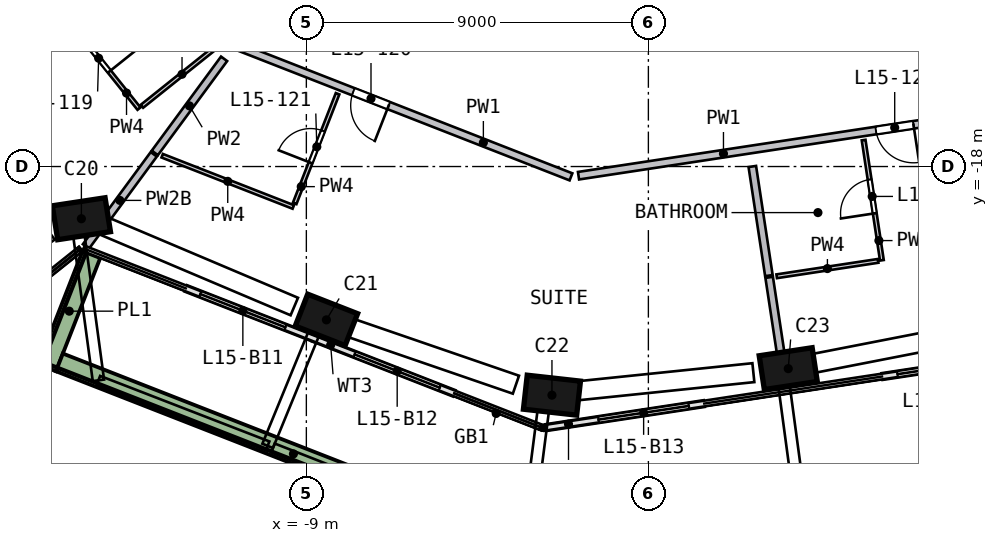
"""IFC4 building model, lengths in metres.
Left out: names, types, materials, properties, quantities, classifications, styles, units other than length and angle.
Written with IfcOpenShell. Run it as: python <this file> out.ifc"""

import sys

from ifc_helpers import new_model, si_unit, direction, frame, frame_2d, origin, origin_2d, place, context, subcontext, project, spatial, rectangle, extrude, element, fill, save


model = new_model("IFC4")
c1 = context("Model", 3, precision=1e-05, world=origin(), true_north=direction((0.0, 1.0)))
c2 = subcontext(c1, "Body", "Model", "MODEL_VIEW")
j1 = project(units=[si_unit("LENGTHUNIT", "METRE"), si_unit("PLANEANGLEUNIT", "RADIAN")], contexts=[c1])
p1 = place(None, origin())
s1 = spatial("IfcSite", under=j1, at=p1, CompositionType="ELEMENT")
p2 = place(p1, origin())
s2 = spatial("IfcBuilding", under=s1, at=p2, CompositionType="ELEMENT")
p3 = place(p2, frame((0.0, 0.0, 68.0)))
s3 = spatial("IfcBuildingStorey", under=s2, at=p3, CompositionType="ELEMENT", Elevation=68.0)
p4 = place(p3, frame((-15.031, -19.289, 0.0), z_axis=(0.092283458, -0.07061889, 0.99322542), x_axis=(-0.984352018, -0.156849959, 0.080306883)))
e1 = element("IfcColumn", 1, at=p4, inside=s3, PredefinedType="COLUMN", context=c2, shape_type="SweptSolid", body=[
    extrude(rectangle(XDim=1.4, YDim=0.9, at=origin_2d()), origin(), (0.0, 0.0, 1.0), 3.212),
])
p5 = place(p3, frame((-8.599, -21.987, 0.0), z_axis=(0.104949359, -0.040002437, 0.993672701), x_axis=(0.925474949, -0.361776799, -0.112310579)))
e2 = element("IfcColumn", 2, at=p5, inside=s3, PredefinedType="COLUMN", context=c2, shape_type="SweptSolid", body=[
    extrude(rectangle(XDim=1.4, YDim=0.9, at=origin_2d()), origin(), (0.0, 0.0, 1.0), 3.21),
])
p6 = place(p3, frame((-2.675, -24.003, 0.0), z_axis=(0.11419492, -0.011708401, 0.993389367), x_axis=(-0.987313425, 0.109706748, 0.1147895)))
e3 = element("IfcColumn", 3, at=p6, inside=s3, PredefinedType="COLUMN", context=c2, shape_type="SweptSolid", body=[
    extrude(rectangle(XDim=1.4, YDim=0.9, at=origin_2d()), origin(), (0.0, 0.0, 1.0), 3.211),
])
p7 = place(p3, frame((3.547, -23.34, 0.0), z_axis=(0.110881458, 0.01779579, 0.993674299), x_axis=(0.982419922, 0.149132846, -0.112296444)))
e4 = element("IfcColumn", 4, at=p7, inside=s3, PredefinedType="COLUMN", context=c2, shape_type="SweptSolid", body=[
    extrude(rectangle(XDim=1.4, YDim=0.9, at=origin_2d()), origin(), (0.0, 0.0, 1.0), 3.21),
])
p8 = place(p3, frame((-12.161, -21.211, 0.0), z_axis=(0.0, 0.0, 1.0), x_axis=(0.931306801, -0.364235697, 0.0)))
e5 = element("IfcWall", 5, at=p8, inside=s3, PredefinedType="SOLIDWALL", context=c2, shape_type="SweptSolid", body=[
    extrude(rectangle(XDim=3.6, YDim=0.15, at=frame_2d((1.8, 0.0))), origin(), (0.0, 0.0, 1.0), 2.425),
])
p9 = place(p8, frame((0.4, 0.0, 0.0)))
e6 = element("IfcOpeningElement", 6, at=p9, cuts=e5, PredefinedType="OPENING", context=c2, shape_type="SweptSolid", body=[
    extrude(rectangle(XDim=2.4, YDim=2.4, at=frame_2d((1.2, 1.2))), frame((0.0, 0.085, 0.0), z_axis=(0.0, -1.0, 0.0), x_axis=(1.0, 0.0, 0.0)), (0.0, 0.0, 1.0), 0.17),
])
p10 = place(p3, frame((-8.808, -22.522, 0.0), z_axis=(0.0, 0.0, 1.0), x_axis=(0.931314617, -0.364215712, 0.0)))
e7 = element("IfcWall", 7, at=p10, inside=s3, PredefinedType="SOLIDWALL", context=c2, shape_type="SweptSolid", body=[
    extrude(rectangle(XDim=3.96, YDim=0.15, at=frame_2d((1.98, 0.0))), origin(), (0.0, 0.0, 1.0), 2.425),
])
p11 = place(p10, frame((1.16, 0.0, 0.0)))
e8 = element("IfcOpeningElement", 8, at=p11, cuts=e7, PredefinedType="OPENING", context=c2, shape_type="SweptSolid", body=[
    extrude(rectangle(XDim=2.4, YDim=2.4, at=frame_2d((1.2, 1.2))), frame((0.0, 0.085, 0.0), z_axis=(0.0, -1.0, 0.0), x_axis=(1.0, 0.0, 0.0)), (0.0, 0.0, 1.0), 0.17),
])
p12 = place(p3, frame((-2.694, -24.87, 0.0), z_axis=(0.0, 0.0, 1.0), x_axis=(0.988648334, 0.150248032, 0.0)))
e9 = element("IfcWall", 9, at=p12, inside=s3, PredefinedType="SOLIDWALL", context=c2, shape_type="SweptSolid", body=[
    extrude(rectangle(XDim=4.199, YDim=0.15, at=frame_2d((2.099, 0.0))), origin(), (0.0, 0.0, 1.0), 2.425),
])
p13 = place(p12, frame((1.399, 0.0, 0.0)))
e10 = element("IfcOpeningElement", 10, at=p13, cuts=e9, PredefinedType="OPENING", context=c2, shape_type="SweptSolid", body=[
    extrude(rectangle(XDim=2.4, YDim=2.4, at=frame_2d((1.2, 1.2))), frame((0.0, 0.085, 0.0), z_axis=(0.0, -1.0, 0.0), x_axis=(1.0, 0.0, 0.0)), (0.0, 0.0, 1.0), 0.17),
])
p14 = place(p3, frame((6.162, -23.525, 0.0), z_axis=(0.0, 0.0, 1.0), x_axis=(0.988650664, 0.150232704, 0.0)))
e11 = element("IfcWall", 11, at=p14, inside=s3, PredefinedType="SOLIDWALL", context=c2, shape_type="SweptSolid", body=[
    extrude(rectangle(XDim=3.842, YDim=0.15, at=frame_2d((1.921, 0.0))), origin(), (0.0, 0.0, 1.0), 2.425),
])
p15 = place(p14, frame((0.4, 0.0, 0.0)))
e12 = element("IfcOpeningElement", 12, at=p15, cuts=e11, PredefinedType="OPENING", context=c2, shape_type="SweptSolid", body=[
    extrude(rectangle(XDim=2.4, YDim=2.4, at=frame_2d((1.2, 1.2))), frame((0.0, 0.085, 0.0), z_axis=(0.0, -1.0, 0.0), x_axis=(1.0, 0.0, 0.0)), (0.0, 0.0, 1.0), 0.17),
])
p16 = place(p3, frame((-14.656, -20.317, 0.0), z_axis=(0.0, 0.0, 1.0), x_axis=(-0.364261223, -0.931296817, 0.0)))
e13 = element("IfcWall", 13, at=p16, inside=s3, PredefinedType="SOLIDWALL", context=c2, shape_type="SweptSolid", body=[
    extrude(rectangle(XDim=3.199, YDim=0.5, at=frame_2d((1.6, 0.0))), origin(), (0.0, 0.0, 1.0), 0.7),
])
p17 = place(p3, frame((-15.498, -23.154, 0.0), z_axis=(0.0, 0.0, 1.0), x_axis=(0.931308957, -0.364230183, 0.0)))
e14 = element("IfcWall", 14, at=p17, inside=s3, PredefinedType="SOLIDWALL", context=c2, shape_type="SweptSolid", body=[
    extrude(rectangle(XDim=13.224, YDim=0.5, at=frame_2d((6.612, 0.0))), origin(), (0.0, 0.0, 1.0), 0.7),
])
p18 = place(p3, frame((-3.054, -27.985, 0.0), z_axis=(0.0, 0.0, 1.0), x_axis=(0.988652978, 0.150217471, 0.0)))
e15 = element("IfcWall", 15, at=p18, inside=s3, PredefinedType="SOLIDWALL", context=c2, shape_type="SweptSolid", body=[
    extrude(rectangle(XDim=13.724, YDim=0.5, at=frame_2d((6.862, 0.0))), origin(), (0.0, 0.0, 1.0), 0.7),
])
p19 = place(p3, frame((-26.85, -20.057, 0.0), z_axis=(0.0, 0.0, 1.0), x_axis=(0.78108065, 0.624430155, 0.0)))
e16 = element("IfcWall", 16, at=p19, inside=s3, PredefinedType="SOLIDWALL", context=c2, shape_type="SweptSolid", body=[
    extrude(rectangle(XDim=15.738, YDim=0.2, at=frame_2d((7.869, 0.0))), origin(), (0.0, 0.0, 1.0), 3.19),
])
p20 = place(p19, frame((9.769, 0.0, 0.0)))
e17 = element("IfcOpeningElement", 17, at=p20, cuts=e16, PredefinedType="OPENING", context=c2, shape_type="SweptSolid", body=[
    extrude(rectangle(XDim=1.0, YDim=2.1, at=frame_2d((0.5, 1.05))), frame((0.0, 0.11, 0.0), z_axis=(0.0, -1.0, 0.0), x_axis=(1.0, 0.0, 0.0)), (0.0, 0.0, 1.0), 0.22),
])
p21 = place(p3, frame((-13.34, -12.073, 0.0), z_axis=(0.0, 0.0, 1.0), x_axis=(-0.781097167, -0.624409493, 0.0)))
e18 = element("IfcWall", 18, at=p21, inside=s3, PredefinedType="SOLIDWALL", context=c2, shape_type="SweptSolid", body=[
    extrude(rectangle(XDim=15.538, YDim=0.2, at=frame_2d((7.769, 0.0))), origin(), (0.0, 0.0, 1.0), 3.19),
])
p22 = place(p21, frame((6.85, 0.0, 0.0)))
e19 = element("IfcOpeningElement", 19, at=p22, cuts=e18, PredefinedType="OPENING", context=c2, shape_type="SweptSolid", body=[
    extrude(rectangle(XDim=1.0, YDim=2.1, at=frame_2d((0.5, 1.05))), frame((0.0, 0.11, 0.0), z_axis=(0.0, -1.0, 0.0), x_axis=(1.0, 0.0, 0.0)), (0.0, 0.0, 1.0), 0.22),
])
p23 = place(p3, frame((-2.037, -18.271, 0.0), z_axis=(0.0, 0.0, 1.0), x_axis=(-0.931306737, 0.364235861, 0.0)))
e20 = element("IfcWall", 20, at=p23, inside=s3, PredefinedType="SOLIDWALL", context=c2, shape_type="SweptSolid", body=[
    extrude(rectangle(XDim=9.516, YDim=0.2, at=frame_2d((4.758, 0.0))), origin(), (0.0, 0.0, 1.0), 3.19),
])
p24 = place(p23, frame((5.15, 0.0, 0.0)))
e21 = element("IfcOpeningElement", 21, at=p24, cuts=e20, PredefinedType="OPENING", context=c2, shape_type="SweptSolid", body=[
    extrude(rectangle(XDim=1.0, YDim=2.1, at=frame_2d((0.5, 1.05))), frame((0.0, 0.11, 0.0), z_axis=(0.0, -1.0, 0.0), x_axis=(1.0, 0.0, 0.0)), (0.0, 0.0, 1.0), 0.22),
])
p25 = place(p3, frame((7.174, -16.872, 0.0), z_axis=(0.0, 0.0, 1.0), x_axis=(-0.988652066, -0.150223477, 0.0)))
e22 = element("IfcWall", 22, at=p25, inside=s3, PredefinedType="SOLIDWALL", context=c2, shape_type="SweptSolid", body=[
    extrude(rectangle(XDim=9.116, YDim=0.2, at=frame_2d((4.558, 0.0))), origin(), (0.0, 0.0, 1.0), 3.19),
])
p26 = place(p25, frame((0.2, 0.0, 0.0)))
e23 = element("IfcOpeningElement", 23, at=p26, cuts=e22, PredefinedType="OPENING", context=c2, shape_type="SweptSolid", body=[
    extrude(rectangle(XDim=1.0, YDim=2.1, at=frame_2d((0.5, 1.05))), frame((0.0, 0.11, 0.0), z_axis=(0.0, -1.0, 0.0), x_axis=(1.0, 0.0, 0.0)), (0.0, 0.0, 1.0), 0.22),
])
p27 = place(p3, frame((-13.015, -17.679, 0.0), z_axis=(0.0, 0.0, 1.0), x_axis=(-0.592828383, -0.80532882, 0.0)))
e24 = element("IfcWall", 24, at=p27, inside=s3, PredefinedType="SOLIDWALL", context=c2, shape_type="SweptSolid", body=[
    extrude(rectangle(XDim=3.011, YDim=0.2, at=frame_2d((1.506, 0.0))), origin(), (0.0, 0.0, 1.0), 2.69),
])
p28 = place(p3, frame((-11.165, -15.166, 0.0), z_axis=(0.0, 0.0, 1.0), x_axis=(-0.592836025, -0.805323194, 0.0)))
e25 = element("IfcWall", 25, at=p28, inside=s3, PredefinedType="SOLIDWALL", context=c2, shape_type="SweptSolid", body=[
    extrude(rectangle(XDim=3.075, YDim=0.2, at=frame_2d((1.537, 0.0))), origin(), (0.0, 0.0, 1.0), 3.19),
])
p29 = place(p3, frame((2.735, -17.999, 0.0), z_axis=(0.0, 0.0, 1.0), x_axis=(0.15027592, -0.988644096, 0.0)))
e26 = element("IfcWall", 26, at=p29, inside=s3, PredefinedType="SOLIDWALL", context=c2, shape_type="SweptSolid", body=[
    extrude(rectangle(XDim=2.905, YDim=0.2, at=frame_2d((1.452, 0.0))), origin(), (0.0, 0.0, 1.0), 3.19),
])
p30 = place(p3, frame((3.178, -20.916, 0.0), z_axis=(0.0, 0.0, 1.0), x_axis=(0.150192463, -0.988656778, 0.0)))
e27 = element("IfcWall", 27, at=p30, inside=s3, PredefinedType="SOLIDWALL", context=c2, shape_type="SweptSolid", body=[
    extrude(rectangle(XDim=2.952, YDim=0.2, at=frame_2d((1.476, 0.0))), origin(), (0.0, 0.0, 1.0), 3.19),
])
p31 = place(p3, frame((-15.402, -13.977, 0.0), z_axis=(0.0, 0.0, 1.0), x_axis=(0.624443812, -0.781069731, 0.0)))
e28 = element("IfcWall", 28, at=p31, inside=s3, PredefinedType="PARTITIONING", context=c2, shape_type="SweptSolid", body=[
    extrude(rectangle(XDim=3.2, YDim=0.1, at=frame_2d((1.6, 0.0))), origin(), (0.0, 0.0, 1.0), 3.19),
])
p32 = place(p31, frame((1.05, 0.0, 0.0)))
e29 = element("IfcOpeningElement", 29, at=p32, cuts=e28, PredefinedType="OPENING", context=c2, shape_type="SweptSolid", body=[
    extrude(rectangle(XDim=0.9, YDim=2.1, at=frame_2d((0.45, 1.05))), frame((0.0, 0.06, 0.0), z_axis=(0.0, -1.0, 0.0), x_axis=(1.0, 0.0, 0.0)), (0.0, 0.0, 1.0), 0.12),
])
p33 = place(p3, frame((-11.217, -14.729, 0.0), z_axis=(0.0, 0.0, 1.0), x_axis=(-0.781062848, -0.624452423, 0.0)))
e30 = element("IfcWall", 30, at=p33, inside=s3, PredefinedType="PARTITIONING", context=c2, shape_type="SweptSolid", body=[
    extrude(rectangle(XDim=2.7, YDim=0.1, at=frame_2d((1.35, 0.0))), origin(), (0.0, 0.0, 1.0), 3.19),
])
p34 = place(p3, frame((-9.344, -19.064, 0.0), z_axis=(0.0, 0.0, 1.0), x_axis=(-0.931326393, 0.364185598, 0.0)))
e31 = element("IfcWall", 31, at=p34, inside=s3, PredefinedType="PARTITIONING", context=c2, shape_type="SweptSolid", body=[
    extrude(rectangle(XDim=3.704, YDim=0.1, at=frame_2d((1.852, 0.0))), origin(), (0.0, 0.0, 1.0), 3.19),
])
p35 = place(p3, frame((-9.308, -18.971, 0.0), z_axis=(0.0, 0.0, 1.0), x_axis=(0.364224153, 0.931311315, 0.0)))
e32 = element("IfcWall", 32, at=p35, inside=s3, PredefinedType="PARTITIONING", context=c2, shape_type="SweptSolid", body=[
    extrude(rectangle(XDim=3.1, YDim=0.1, at=frame_2d((1.55, 0.0))), origin(), (0.0, 0.0, 1.0), 3.19),
])
p36 = place(p35, frame((1.15, 0.0, 0.0)))
e33 = element("IfcOpeningElement", 33, at=p36, cuts=e32, PredefinedType="OPENING", context=c2, shape_type="SweptSolid", body=[
    extrude(rectangle(XDim=0.9, YDim=2.1, at=frame_2d((0.45, 1.05))), frame((0.0, 0.06, 0.0), z_axis=(0.0, -1.0, 0.0), x_axis=(1.0, 0.0, 0.0)), (0.0, 0.0, 1.0), 0.12),
])
p37 = place(p3, frame((6.046, -20.483, 0.0), z_axis=(0.0, 0.0, 1.0), x_axis=(-0.988657395, -0.150188397, 0.0)))
e34 = element("IfcWall", 34, at=p37, inside=s3, PredefinedType="PARTITIONING", context=c2, shape_type="SweptSolid", body=[
    extrude(rectangle(XDim=2.7, YDim=0.1, at=frame_2d((1.35, 0.0))), origin(), (0.0, 0.0, 1.0), 3.19),
])
p38 = place(p3, frame((6.145, -20.468, 0.0), z_axis=(0.0, 0.0, 1.0), x_axis=(-0.150228011, 0.988651377, 0.0)))
e35 = element("IfcWall", 35, at=p38, inside=s3, PredefinedType="PARTITIONING", context=c2, shape_type="SweptSolid", body=[
    extrude(rectangle(XDim=3.2, YDim=0.1, at=frame_2d((1.6, 0.0))), origin(), (0.0, 0.0, 1.0), 3.19),
])
p39 = place(p38, frame((1.25, 0.0, 0.0)))
e36 = element("IfcOpeningElement", 36, at=p39, cuts=e35, PredefinedType="OPENING", context=c2, shape_type="SweptSolid", body=[
    extrude(rectangle(XDim=0.9, YDim=2.1, at=frame_2d((0.45, 1.05))), frame((0.0, 0.06, 0.0), z_axis=(0.0, -1.0, 0.0), x_axis=(1.0, 0.0, 0.0)), (0.0, 0.0, 1.0), 0.12),
])
p40 = place(p9, origin())
e37 = element("IfcDoor", 37, at=p40, inside=s3, OperationType="SLIDING_TO_RIGHT", PredefinedType="DOOR", context=c2, shape_type="SweptSolid", body=[
    extrude(rectangle(XDim=2.4, YDim=2.4, at=frame_2d((1.2, 1.2))), frame((0.0, 0.025, 0.0), z_axis=(0.0, -1.0, 0.0), x_axis=(1.0, 0.0, 0.0)), (0.0, 0.0, 1.0), 0.05),
])
fill(e6, e37)
p41 = place(p11, origin())
e38 = element("IfcDoor", 38, at=p41, inside=s3, OperationType="SLIDING_TO_LEFT", PredefinedType="DOOR", context=c2, shape_type="SweptSolid", body=[
    extrude(rectangle(XDim=2.4, YDim=2.4, at=frame_2d((1.2, 1.2))), frame((0.0, 0.025, 0.0), z_axis=(0.0, -1.0, 0.0), x_axis=(1.0, 0.0, 0.0)), (0.0, 0.0, 1.0), 0.05),
])
fill(e8, e38)
p42 = place(p13, origin())
e39 = element("IfcDoor", 39, at=p42, inside=s3, OperationType="SLIDING_TO_LEFT", PredefinedType="DOOR", context=c2, shape_type="SweptSolid", body=[
    extrude(rectangle(XDim=2.4, YDim=2.4, at=frame_2d((1.2, 1.2))), frame((0.0, 0.025, 0.0), z_axis=(0.0, -1.0, 0.0), x_axis=(1.0, 0.0, 0.0)), (0.0, 0.0, 1.0), 0.05),
])
fill(e10, e39)
p43 = place(p15, origin())
e40 = element("IfcDoor", 40, at=p43, inside=s3, OperationType="SLIDING_TO_RIGHT", PredefinedType="DOOR", context=c2, shape_type="SweptSolid", body=[
    extrude(rectangle(XDim=2.4, YDim=2.4, at=frame_2d((1.2, 1.2))), frame((0.0, 0.025, 0.0), z_axis=(0.0, -1.0, 0.0), x_axis=(1.0, 0.0, 0.0)), (0.0, 0.0, 1.0), 0.05),
])
fill(e12, e40)
p44 = place(p32, origin())
e41 = element("IfcDoor", 41, at=p44, inside=s3, OperationType="SINGLE_SWING_RIGHT", PredefinedType="DOOR", context=c2, shape_type="SweptSolid", body=[
    extrude(rectangle(XDim=0.9, YDim=2.1, at=frame_2d((0.45, 1.05))), frame((0.0, 0.025, 0.0), z_axis=(0.0, -1.0, 0.0), x_axis=(1.0, 0.0, 0.0)), (0.0, 0.0, 1.0), 0.05),
])
fill(e29, e41)
p45 = place(p24, origin())
e42 = element("IfcDoor", 42, at=p45, inside=s3, OperationType="SINGLE_SWING_LEFT", PredefinedType="DOOR", context=c2, shape_type="SweptSolid", body=[
    extrude(rectangle(XDim=1.0, YDim=2.1, at=frame_2d((0.5, 1.05))), frame((0.0, 0.025, 0.0), z_axis=(0.0, -1.0, 0.0), x_axis=(1.0, 0.0, 0.0)), (0.0, 0.0, 1.0), 0.05),
])
fill(e21, e42)
p46 = place(p36, origin())
e43 = element("IfcDoor", 43, at=p46, inside=s3, OperationType="SINGLE_SWING_LEFT", PredefinedType="DOOR", context=c2, shape_type="SweptSolid", body=[
    extrude(rectangle(XDim=0.9, YDim=2.1, at=frame_2d((0.45, 1.05))), frame((0.0, 0.025, 0.0), z_axis=(0.0, -1.0, 0.0), x_axis=(1.0, 0.0, 0.0)), (0.0, 0.0, 1.0), 0.05),
])
fill(e33, e43)
p47 = place(p26, origin())
e44 = element("IfcDoor", 44, at=p47, inside=s3, OperationType="SINGLE_SWING_LEFT", PredefinedType="DOOR", context=c2, shape_type="SweptSolid", body=[
    extrude(rectangle(XDim=1.0, YDim=2.1, at=frame_2d((0.5, 1.05))), frame((0.0, 0.025, 0.0), z_axis=(0.0, -1.0, 0.0), x_axis=(1.0, 0.0, 0.0)), (0.0, 0.0, 1.0), 0.05),
])
fill(e23, e44)
p48 = place(p39, origin())
e45 = element("IfcDoor", 45, at=p48, inside=s3, OperationType="SINGLE_SWING_LEFT", PredefinedType="DOOR", context=c2, shape_type="SweptSolid", body=[
    extrude(rectangle(XDim=0.9, YDim=2.1, at=frame_2d((0.45, 1.05))), frame((0.0, 0.025, 0.0), z_axis=(0.0, -1.0, 0.0), x_axis=(1.0, 0.0, 0.0)), (0.0, 0.0, 1.0), 0.05),
])
fill(e36, e45)
save(model, sys.argv[1])
